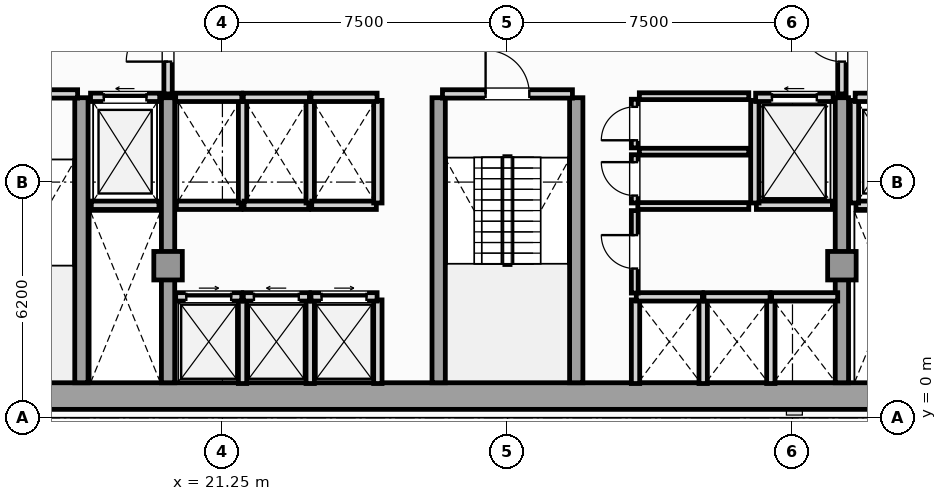
"""IFC4 building model, lengths in metres.
Left out: names, types, materials, properties, quantities, classifications, styles, units other than length and angle.
Written with IfcOpenShell. Run it as: python <this file> out.ifc"""

import sys

from ifc_helpers import new_model, si_unit, direction, frame, frame_2d, origin, origin_2d, place, context, subcontext, project, spatial, rectangle, extrude, element, fill, save


model = new_model("IFC4")
c1 = context("Model", 3, precision=1e-05, world=origin(), true_north=direction((0.0, 1.0)))
c2 = subcontext(c1, "Body", "Model", "MODEL_VIEW")
j1 = project(units=[si_unit("LENGTHUNIT", "METRE"), si_unit("PLANEANGLEUNIT", "RADIAN")], contexts=[c1])
p1 = place(None, origin())
s1 = spatial("IfcSite", under=j1, at=p1, CompositionType="ELEMENT")
p2 = place(p1, origin())
s2 = spatial("IfcBuilding", under=s1, at=p2, CompositionType="ELEMENT")
p3 = place(p2, frame((0.0, 0.0, 72.15)))
s3 = spatial("IfcBuildingStorey", under=s2, at=p3, CompositionType="ELEMENT", Elevation=72.15)
p4 = place(p3, frame((13.25, 0.57, 0.0), z_axis=(0.0, 0.0, 1.0), x_axis=(1.0, 0.0, 0.0)))
e1 = element("IfcWall", 1, at=p4, inside=s3, PredefinedType="SHEAR", context=c2, shape_type="SweptSolid", body=[
    extrude(rectangle(XDim=31.0, YDim=0.7, at=frame_2d((15.5, 0.0))), origin(), (0.0, 0.0, 1.0), 3.57),
])
for number, where, z_axis, x_axis in (
    (2, (17.54, 0.92, 0.0), (0.0, 0.0, 1.0), (0.0, 1.0, 0.0)),
    (3, (19.82, 0.92, 0.0), (0.0, 0.0, 1.0), (0.0, 1.0, 0.0)),
    (4, (26.94, 0.92, 0.0), (0.0, 0.0, 1.0), (0.0, 1.0, 0.0)),
    (5, (30.56, 0.92, 0.0), (0.0, 0.0, 1.0), (0.0, 1.0, 0.0)),
    (6, (37.55, 0.92, 0.0), (0.0, 0.0, 1.0), (0.0, 1.0, 0.0)),
):
    element("IfcWall", number, at=place(p3, frame(where, z_axis=z_axis, x_axis=x_axis)), inside=s3, PredefinedType="SHEAR", context=c2, shape_type="SweptSolid", body=[
        extrude(rectangle(XDim=7.5, YDim=0.35, at=frame_2d((3.75, 0.0))), origin(), (0.0, 0.0, 1.0), 3.57),
    ])
for number, where, z_axis, x_axis in (
    (7, (19.82, 4.0, 0.0), (0.0, 0.0, 1.0), (1.0, 0.0, 0.0)),
    (8, (37.55, 4.0, 0.0), (0.0, 0.0, 1.0), (1.0, 0.0, 0.0)),
):
    element("IfcColumn", number, at=place(p3, frame(where, z_axis=z_axis, x_axis=x_axis)), inside=s3, PredefinedType="COLUMN", context=c2, shape_type="SweptSolid", body=[
        extrude(rectangle(XDim=0.75, YDim=0.75, at=origin_2d()), origin(), (0.0, 0.0, 1.0), 3.85),
    ])
p5 = place(p3, frame((17.8, 5.59, 0.0), z_axis=(0.0, 0.0, 1.0), x_axis=(1.0, 0.0, 0.0)))
e9 = element("IfcWall", 9, at=p5, inside=s3, PredefinedType="SOLIDWALL", context=c2, shape_type="SweptSolid", body=[
    extrude(rectangle(XDim=1.78, YDim=0.22, at=frame_2d((0.89, 0.0))), origin(), (0.0, 0.0, 1.0), 3.57),
])
p6 = place(p3, frame((17.78, 8.43, 0.0), z_axis=(0.0, 0.0, 1.0), x_axis=(1.0, 0.0, 0.0)))
e10 = element("IfcWall", 10, at=p6, inside=s3, PredefinedType="SOLIDWALL", context=c2, shape_type="SweptSolid", body=[
    extrude(rectangle(XDim=1.82, YDim=0.22, at=frame_2d((0.91, 0.0))), origin(), (0.0, 0.0, 1.0), 3.57),
])
p7 = place(p6, frame((0.35, 0.0, 0.0)))
e11 = element("IfcOpeningElement", 11, at=p7, cuts=e10, PredefinedType="OPENING", context=c2, shape_type="SweptSolid", body=[
    extrude(rectangle(XDim=1.12, YDim=2.25, at=frame_2d((0.56, 1.125))), frame((0.0, 0.12, 0.0), z_axis=(0.0, -1.0, 0.0), x_axis=(1.0, 0.0, 0.0)), (0.0, 0.0, 1.0), 0.24),
])
p8 = place(p3, frame((37.92, 5.59, 0.0), z_axis=(0.0, 0.0, 1.0), x_axis=(1.0, 0.0, 0.0)))
e12 = element("IfcWall", 12, at=p8, inside=s3, PredefinedType="SOLIDWALL", context=c2, shape_type="SweptSolid", body=[
    extrude(rectangle(XDim=1.78, YDim=0.22, at=frame_2d((0.89, 0.0))), origin(), (0.0, 0.0, 1.0), 3.57),
])
p9 = place(p3, frame((37.88, 5.65, 0.0), z_axis=(0.0, 0.0, 1.0), x_axis=(0.0, 1.0, 0.0)))
e13 = element("IfcWall", 13, at=p9, inside=s3, PredefinedType="SOLIDWALL", context=c2, shape_type="SweptSolid", body=[
    extrude(rectangle(XDim=2.7, YDim=0.22, at=frame_2d((1.35, 0.0))), origin(), (0.0, 0.0, 1.0), 3.57),
])
p10 = place(p3, frame((37.9, 8.43, 0.0), z_axis=(0.0, 0.0, 1.0), x_axis=(1.0, 0.0, 0.0)))
e14 = element("IfcWall", 14, at=p10, inside=s3, PredefinedType="SOLIDWALL", context=c2, shape_type="SweptSolid", body=[
    extrude(rectangle(XDim=1.82, YDim=0.22, at=frame_2d((0.91, 0.0))), origin(), (0.0, 0.0, 1.0), 3.57),
])
p11 = place(p10, frame((0.35, 0.0, 0.0)))
e15 = element("IfcOpeningElement", 15, at=p11, cuts=e14, PredefinedType="OPENING", context=c2, shape_type="SweptSolid", body=[
    extrude(rectangle(XDim=1.12, YDim=2.25, at=frame_2d((0.56, 1.125))), frame((0.0, 0.12, 0.0), z_axis=(0.0, -1.0, 0.0), x_axis=(1.0, 0.0, 0.0)), (0.0, 0.0, 1.0), 0.24),
])
p12 = place(p3, frame((35.3, 5.59, 0.0), z_axis=(0.0, 0.0, 1.0), x_axis=(1.0, 0.0, 0.0)))
e16 = element("IfcWall", 16, at=p12, inside=s3, PredefinedType="SOLIDWALL", context=c2, shape_type="SweptSolid", body=[
    extrude(rectangle(XDim=2.0, YDim=0.22, at=frame_2d((1.0, 0.0))), origin(), (0.0, 0.0, 1.0), 3.57),
])
p13 = place(p3, frame((35.26, 5.65, 0.0), z_axis=(0.0, 0.0, 1.0), x_axis=(0.0, 1.0, 0.0)))
e17 = element("IfcWall", 17, at=p13, inside=s3, PredefinedType="SOLIDWALL", context=c2, shape_type="SweptSolid", body=[
    extrude(rectangle(XDim=2.7, YDim=0.22, at=frame_2d((1.35, 0.0))), origin(), (0.0, 0.0, 1.0), 3.57),
])
p14 = place(p3, frame((35.28, 8.43, 0.0), z_axis=(0.0, 0.0, 1.0), x_axis=(1.0, 0.0, 0.0)))
e18 = element("IfcWall", 18, at=p14, inside=s3, PredefinedType="SOLIDWALL", context=c2, shape_type="SweptSolid", body=[
    extrude(rectangle(XDim=2.04, YDim=0.22, at=frame_2d((1.02, 0.0))), origin(), (0.0, 0.0, 1.0), 3.57),
])
p15 = place(p14, frame((0.43, 0.0, 0.0)))
e19 = element("IfcOpeningElement", 19, at=p15, cuts=e18, PredefinedType="OPENING", context=c2, shape_type="SweptSolid", body=[
    extrude(rectangle(XDim=1.18, YDim=2.2, at=frame_2d((0.59, 1.1))), frame((0.0, 0.12, 0.0), z_axis=(0.0, -1.0, 0.0), x_axis=(1.0, 0.0, 0.0)), (0.0, 0.0, 1.0), 0.24),
])
p16 = place(p3, frame((21.78, 0.9, 0.0), z_axis=(0.0, 0.0, 1.0), x_axis=(0.0, 1.0, 0.0)))
e20 = element("IfcWall", 20, at=p16, inside=s3, PredefinedType="SOLIDWALL", context=c2, shape_type="SweptSolid", body=[
    extrude(rectangle(XDim=2.2, YDim=0.22, at=frame_2d((1.1, 0.0))), origin(), (0.0, 0.0, 1.0), 3.57),
])
p17 = place(p3, frame((20.02, 3.18, 0.0), z_axis=(0.0, 0.0, 1.0), x_axis=(1.0, 0.0, 0.0)))
e21 = element("IfcWall", 21, at=p17, inside=s3, PredefinedType="SOLIDWALL", context=c2, shape_type="SweptSolid", body=[
    extrude(rectangle(XDim=1.74, YDim=0.22, at=frame_2d((0.87, 0.0))), origin(), (0.0, 0.0, 1.0), 3.57),
])
p18 = place(p17, frame((0.28, 0.0, 0.0)))
e22 = element("IfcOpeningElement", 22, at=p18, cuts=e21, PredefinedType="OPENING", context=c2, shape_type="SweptSolid", body=[
    extrude(rectangle(XDim=1.18, YDim=2.2, at=frame_2d((0.59, 1.1))), frame((0.0, 0.12, 0.0), z_axis=(0.0, -1.0, 0.0), x_axis=(1.0, 0.0, 0.0)), (0.0, 0.0, 1.0), 0.24),
])
p19 = place(p3, frame((23.56, 0.9, 0.0), z_axis=(0.0, 0.0, 1.0), x_axis=(0.0, 1.0, 0.0)))
e23 = element("IfcWall", 23, at=p19, inside=s3, PredefinedType="SOLIDWALL", context=c2, shape_type="SweptSolid", body=[
    extrude(rectangle(XDim=2.2, YDim=0.22, at=frame_2d((1.1, 0.0))), origin(), (0.0, 0.0, 1.0), 3.57),
])
p20 = place(p3, frame((21.8, 3.18, 0.0), z_axis=(0.0, 0.0, 1.0), x_axis=(1.0, 0.0, 0.0)))
e24 = element("IfcWall", 24, at=p20, inside=s3, PredefinedType="SOLIDWALL", context=c2, shape_type="SweptSolid", body=[
    extrude(rectangle(XDim=1.74, YDim=0.22, at=frame_2d((0.87, 0.0))), origin(), (0.0, 0.0, 1.0), 3.57),
])
p21 = place(p20, frame((0.28, 0.0, 0.0)))
e25 = element("IfcOpeningElement", 25, at=p21, cuts=e24, PredefinedType="OPENING", context=c2, shape_type="SweptSolid", body=[
    extrude(rectangle(XDim=1.18, YDim=2.2, at=frame_2d((0.59, 1.1))), frame((0.0, 0.12, 0.0), z_axis=(0.0, -1.0, 0.0), x_axis=(1.0, 0.0, 0.0)), (0.0, 0.0, 1.0), 0.24),
])
p22 = place(p3, frame((25.34, 0.9, 0.0), z_axis=(0.0, 0.0, 1.0), x_axis=(0.0, 1.0, 0.0)))
e26 = element("IfcWall", 26, at=p22, inside=s3, PredefinedType="SOLIDWALL", context=c2, shape_type="SweptSolid", body=[
    extrude(rectangle(XDim=2.2, YDim=0.22, at=frame_2d((1.1, 0.0))), origin(), (0.0, 0.0, 1.0), 3.57),
])
p23 = place(p3, frame((23.58, 3.18, 0.0), z_axis=(0.0, 0.0, 1.0), x_axis=(1.0, 0.0, 0.0)))
e27 = element("IfcWall", 27, at=p23, inside=s3, PredefinedType="SOLIDWALL", context=c2, shape_type="SweptSolid", body=[
    extrude(rectangle(XDim=1.74, YDim=0.22, at=frame_2d((0.87, 0.0))), origin(), (0.0, 0.0, 1.0), 3.57),
])
p24 = place(p23, frame((0.28, 0.0, 0.0)))
e28 = element("IfcOpeningElement", 28, at=p24, cuts=e27, PredefinedType="OPENING", context=c2, shape_type="SweptSolid", body=[
    extrude(rectangle(XDim=1.18, YDim=2.2, at=frame_2d((0.59, 1.1))), frame((0.0, 0.12, 0.0), z_axis=(0.0, -1.0, 0.0), x_axis=(1.0, 0.0, 0.0)), (0.0, 0.0, 1.0), 0.24),
])
for number, where, z_axis, x_axis in (
    (29, (32.12, 0.9, 0.0), (0.0, 0.0, 1.0), (0.0, 1.0, 0.0)),
    (30, (33.9, 0.9, 0.0), (0.0, 0.0, 1.0), (0.0, 1.0, 0.0)),
):
    element("IfcWall", number, at=place(p3, frame(where, z_axis=z_axis, x_axis=x_axis)), inside=s3, PredefinedType="SOLIDWALL", context=c2, shape_type="SweptSolid", body=[
        extrude(rectangle(XDim=2.2, YDim=0.22, at=frame_2d((1.1, 0.0))), origin(), (0.0, 0.0, 1.0), 3.57),
    ])
p25 = place(p3, frame((32.14, 3.18, 0.0), z_axis=(0.0, 0.0, 1.0), x_axis=(1.0, 0.0, 0.0)))
e31 = element("IfcWall", 31, at=p25, inside=s3, PredefinedType="SOLIDWALL", context=c2, shape_type="SweptSolid", body=[
    extrude(rectangle(XDim=1.74, YDim=0.22, at=frame_2d((0.87, 0.0))), origin(), (0.0, 0.0, 1.0), 3.57),
])
p26 = place(p3, frame((35.68, 0.9, 0.0), z_axis=(0.0, 0.0, 1.0), x_axis=(0.0, 1.0, 0.0)))
e32 = element("IfcWall", 32, at=p26, inside=s3, PredefinedType="SOLIDWALL", context=c2, shape_type="SweptSolid", body=[
    extrude(rectangle(XDim=2.2, YDim=0.22, at=frame_2d((1.1, 0.0))), origin(), (0.0, 0.0, 1.0), 3.57),
])
for number, where, z_axis, x_axis in (
    (33, (33.92, 3.18, 0.0), (0.0, 0.0, 1.0), (1.0, 0.0, 0.0)),
    (34, (35.7, 3.18, 0.0), (0.0, 0.0, 1.0), (1.0, 0.0, 0.0)),
):
    element("IfcWall", number, at=place(p3, frame(where, z_axis=z_axis, x_axis=x_axis)), inside=s3, PredefinedType="SOLIDWALL", context=c2, shape_type="SweptSolid", body=[
        extrude(rectangle(XDim=1.74, YDim=0.22, at=frame_2d((0.87, 0.0))), origin(), (0.0, 0.0, 1.0), 3.57),
    ])
p27 = place(p3, frame((20.04, 5.59, 0.0), z_axis=(0.0, 0.0, 1.0), x_axis=(1.0, 0.0, 0.0)))
e35 = element("IfcWall", 35, at=p27, inside=s3, PredefinedType="SOLIDWALL", context=c2, shape_type="SweptSolid", body=[
    extrude(rectangle(XDim=1.7, YDim=0.22, at=frame_2d((0.85, 0.0))), origin(), (0.0, 0.0, 1.0), 3.57),
])
p28 = place(p3, frame((21.78, 5.65, 0.0), z_axis=(0.0, 0.0, 1.0), x_axis=(0.0, 1.0, 0.0)))
e36 = element("IfcWall", 36, at=p28, inside=s3, PredefinedType="SOLIDWALL", context=c2, shape_type="SweptSolid", body=[
    extrude(rectangle(XDim=2.7, YDim=0.22, at=frame_2d((1.35, 0.0))), origin(), (0.0, 0.0, 1.0), 3.57),
])
p29 = place(p3, frame((20.02, 8.43, 0.0), z_axis=(0.0, 0.0, 1.0), x_axis=(1.0, 0.0, 0.0)))
e37 = element("IfcWall", 37, at=p29, inside=s3, PredefinedType="SOLIDWALL", context=c2, shape_type="SweptSolid", body=[
    extrude(rectangle(XDim=1.74, YDim=0.22, at=frame_2d((0.87, 0.0))), origin(), (0.0, 0.0, 1.0), 3.57),
])
p30 = place(p3, frame((21.82, 5.59, 0.0), z_axis=(0.0, 0.0, 1.0), x_axis=(1.0, 0.0, 0.0)))
e38 = element("IfcWall", 38, at=p30, inside=s3, PredefinedType="SOLIDWALL", context=c2, shape_type="SweptSolid", body=[
    extrude(rectangle(XDim=1.7, YDim=0.22, at=frame_2d((0.85, 0.0))), origin(), (0.0, 0.0, 1.0), 3.57),
])
p31 = place(p3, frame((23.56, 5.65, 0.0), z_axis=(0.0, 0.0, 1.0), x_axis=(0.0, 1.0, 0.0)))
e39 = element("IfcWall", 39, at=p31, inside=s3, PredefinedType="SOLIDWALL", context=c2, shape_type="SweptSolid", body=[
    extrude(rectangle(XDim=2.7, YDim=0.22, at=frame_2d((1.35, 0.0))), origin(), (0.0, 0.0, 1.0), 3.57),
])
p32 = place(p3, frame((21.8, 8.43, 0.0), z_axis=(0.0, 0.0, 1.0), x_axis=(1.0, 0.0, 0.0)))
e40 = element("IfcWall", 40, at=p32, inside=s3, PredefinedType="SOLIDWALL", context=c2, shape_type="SweptSolid", body=[
    extrude(rectangle(XDim=1.74, YDim=0.22, at=frame_2d((0.87, 0.0))), origin(), (0.0, 0.0, 1.0), 3.57),
])
p33 = place(p3, frame((23.6, 5.59, 0.0), z_axis=(0.0, 0.0, 1.0), x_axis=(1.0, 0.0, 0.0)))
e41 = element("IfcWall", 41, at=p33, inside=s3, PredefinedType="SOLIDWALL", context=c2, shape_type="SweptSolid", body=[
    extrude(rectangle(XDim=1.7, YDim=0.22, at=frame_2d((0.85, 0.0))), origin(), (0.0, 0.0, 1.0), 3.57),
])
p34 = place(p3, frame((25.34, 5.65, 0.0), z_axis=(0.0, 0.0, 1.0), x_axis=(0.0, 1.0, 0.0)))
e42 = element("IfcWall", 42, at=p34, inside=s3, PredefinedType="SOLIDWALL", context=c2, shape_type="SweptSolid", body=[
    extrude(rectangle(XDim=2.7, YDim=0.22, at=frame_2d((1.35, 0.0))), origin(), (0.0, 0.0, 1.0), 3.57),
])
p35 = place(p3, frame((23.58, 8.43, 0.0), z_axis=(0.0, 0.0, 1.0), x_axis=(1.0, 0.0, 0.0)))
e43 = element("IfcWall", 43, at=p35, inside=s3, PredefinedType="SOLIDWALL", context=c2, shape_type="SweptSolid", body=[
    extrude(rectangle(XDim=1.74, YDim=0.22, at=frame_2d((0.87, 0.0))), origin(), (0.0, 0.0, 1.0), 3.57),
])
p36 = place(p3, frame((14.04, 8.52, 0.0), z_axis=(0.0, 0.0, 1.0), x_axis=(1.0, 0.0, 0.0)))
e44 = element("IfcWall", 44, at=p36, inside=s3, PredefinedType="SOLIDWALL", context=c2, shape_type="SweptSolid", body=[
    extrude(rectangle(XDim=3.4, YDim=0.22, at=frame_2d((1.7, 0.0))), origin(), (0.0, 0.0, 1.0), 3.57),
])
p37 = place(p36, frame((1.125, 0.0, 0.0)))
e45 = element("IfcOpeningElement", 45, at=p37, cuts=e44, PredefinedType="OPENING", context=c2, shape_type="SweptSolid", body=[
    extrude(rectangle(XDim=1.15, YDim=2.2, at=frame_2d((0.575, 1.1))), frame((0.0, 0.12, 0.0), z_axis=(0.0, -1.0, 0.0), x_axis=(1.0, 0.0, 0.0)), (0.0, 0.0, 1.0), 0.24),
])
p38 = place(p3, frame((27.04, 8.52, 0.0), z_axis=(0.0, 0.0, 1.0), x_axis=(1.0, 0.0, 0.0)))
e46 = element("IfcWall", 46, at=p38, inside=s3, PredefinedType="SOLIDWALL", context=c2, shape_type="SweptSolid", body=[
    extrude(rectangle(XDim=3.42, YDim=0.22, at=frame_2d((1.71, 0.0))), origin(), (0.0, 0.0, 1.0), 3.57),
])
p39 = place(p38, frame((1.135, 0.0, 0.0)))
e47 = element("IfcOpeningElement", 47, at=p39, cuts=e46, PredefinedType="OPENING", context=c2, shape_type="SweptSolid", body=[
    extrude(rectangle(XDim=1.15, YDim=2.2, at=frame_2d((0.575, 1.1))), frame((0.0, 0.12, 0.0), z_axis=(0.0, -1.0, 0.0), x_axis=(1.0, 0.0, 0.0)), (0.0, 0.0, 1.0), 0.24),
])
p40 = place(p3, frame((19.82, 8.52, 0.0), z_axis=(0.0, 0.0, 1.0), x_axis=(0.0, 1.0, 0.0)))
e48 = element("IfcWall", 48, at=p40, inside=s3, PredefinedType="SOLIDWALL", context=c2, shape_type="SweptSolid", body=[
    extrude(rectangle(XDim=2.8, YDim=0.22, at=frame_2d((1.4, 0.0))), origin(), (0.0, 0.0, 1.0), 3.026),
])
p41 = place(p40, frame((0.85, 0.0, 0.0)))
e49 = element("IfcOpeningElement", 49, at=p41, cuts=e48, PredefinedType="OPENING", context=c2, shape_type="SweptSolid", body=[
    extrude(rectangle(XDim=1.1, YDim=2.2, at=frame_2d((0.55, 1.1))), frame((0.0, 0.12, 0.0), z_axis=(0.0, -1.0, 0.0), x_axis=(1.0, 0.0, 0.0)), (0.0, 0.0, 1.0), 0.24),
])
p42 = place(p3, frame((37.55, 8.52, 0.0), z_axis=(0.0, 0.0, 1.0), x_axis=(0.0, 1.0, 0.0)))
e50 = element("IfcWall", 50, at=p42, inside=s3, PredefinedType="SOLIDWALL", context=c2, shape_type="SweptSolid", body=[
    extrude(rectangle(XDim=2.8, YDim=0.22, at=frame_2d((1.4, 0.0))), origin(), (0.0, 0.0, 1.0), 3.026),
])
p43 = place(p42, frame((0.85, 0.0, 0.0)))
e51 = element("IfcOpeningElement", 51, at=p43, cuts=e50, PredefinedType="OPENING", context=c2, shape_type="SweptSolid", body=[
    extrude(rectangle(XDim=1.1, YDim=2.2, at=frame_2d((0.55, 1.1))), frame((0.0, 0.12, 0.0), z_axis=(0.0, -1.0, 0.0), x_axis=(1.0, 0.0, 0.0)), (0.0, 0.0, 1.0), 0.24),
])
p44 = place(p3, frame((32.1, 5.65, 0.0), z_axis=(0.0, 0.0, 1.0), x_axis=(0.0, 1.0, 0.0)))
e52 = element("IfcWall", 52, at=p44, inside=s3, PredefinedType="PARTITIONING", context=c2, shape_type="SweptSolid", body=[
    extrude(rectangle(XDim=1.27, YDim=0.18, at=frame_2d((0.635, 0.0))), origin(), (0.0, 0.0, 1.0), 3.57),
])
p45 = place(p44, frame((0.195, 0.0, 0.0)))
e53 = element("IfcOpeningElement", 53, at=p45, cuts=e52, PredefinedType="OPENING", context=c2, shape_type="SweptSolid", body=[
    extrude(rectangle(XDim=0.88, YDim=2.05, at=frame_2d((0.44, 1.025))), frame((0.0, 0.1, 0.0), z_axis=(0.0, -1.0, 0.0), x_axis=(1.0, 0.0, 0.0)), (0.0, 0.0, 1.0), 0.2),
])
p46 = place(p3, frame((32.22, 7.0, 0.0), z_axis=(0.0, 0.0, 1.0), x_axis=(1.0, 0.0, 0.0)))
e54 = element("IfcWall", 54, at=p46, inside=s3, PredefinedType="PARTITIONING", context=c2, shape_type="SweptSolid", body=[
    extrude(rectangle(XDim=2.88, YDim=0.18, at=frame_2d((1.44, 0.0))), origin(), (0.0, 0.0, 1.0), 3.57),
])
p47 = place(p3, frame((32.18, 5.57, 0.0), z_axis=(0.0, 0.0, 1.0), x_axis=(1.0, 0.0, 0.0)))
e55 = element("IfcWall", 55, at=p47, inside=s3, PredefinedType="PARTITIONING", context=c2, shape_type="SweptSolid", body=[
    extrude(rectangle(XDim=2.92, YDim=0.18, at=frame_2d((1.46, 0.0))), origin(), (0.0, 0.0, 1.0), 3.57),
])
p48 = place(p3, frame((32.1, 7.1, 0.0), z_axis=(0.0, 0.0, 1.0), x_axis=(0.0, 1.0, 0.0)))
e56 = element("IfcWall", 56, at=p48, inside=s3, PredefinedType="PARTITIONING", context=c2, shape_type="SweptSolid", body=[
    extrude(rectangle(XDim=1.28, YDim=0.18, at=frame_2d((0.64, 0.0))), origin(), (0.0, 0.0, 1.0), 3.57),
])
p49 = place(p48, frame((0.2, 0.0, 0.0)))
e57 = element("IfcOpeningElement", 57, at=p49, cuts=e56, PredefinedType="OPENING", context=c2, shape_type="SweptSolid", body=[
    extrude(rectangle(XDim=0.88, YDim=2.05, at=frame_2d((0.44, 1.025))), frame((0.0, 0.1, 0.0), z_axis=(0.0, -1.0, 0.0), x_axis=(1.0, 0.0, 0.0)), (0.0, 0.0, 1.0), 0.2),
])
p50 = place(p3, frame((32.22, 8.46, 0.0), z_axis=(0.0, 0.0, 1.0), x_axis=(1.0, 0.0, 0.0)))
e58 = element("IfcWall", 58, at=p50, inside=s3, PredefinedType="PARTITIONING", context=c2, shape_type="SweptSolid", body=[
    extrude(rectangle(XDim=2.88, YDim=0.18, at=frame_2d((1.44, 0.0))), origin(), (0.0, 0.0, 1.0), 3.57),
])
p51 = place(p3, frame((32.1, 3.28, 0.0), z_axis=(0.0, 0.0, 1.0), x_axis=(0.0, 1.0, 0.0)))
e59 = element("IfcWall", 59, at=p51, inside=s3, PredefinedType="PARTITIONING", context=c2, shape_type="SweptSolid", body=[
    extrude(rectangle(XDim=2.17, YDim=0.18, at=frame_2d((1.085, 0.0))), origin(), (0.0, 0.0, 1.0), 3.57),
])
p52 = place(p51, frame((0.645, 0.0, 0.0)))
e60 = element("IfcOpeningElement", 60, at=p52, cuts=e59, PredefinedType="OPENING", context=c2, shape_type="SweptSolid", body=[
    extrude(rectangle(XDim=0.88, YDim=2.05, at=frame_2d((0.44, 1.025))), frame((0.0, 0.1, 0.0), z_axis=(0.0, -1.0, 0.0), x_axis=(1.0, 0.0, 0.0)), (0.0, 0.0, 1.0), 0.2),
])
p53 = place(p7, origin())
e61 = element("IfcDoor", 61, at=p53, inside=s3, OperationType="SLIDING_TO_LEFT", PredefinedType="DOOR", context=c2, shape_type="SweptSolid", body=[
    extrude(rectangle(XDim=1.12, YDim=2.25, at=frame_2d((0.56, 1.125))), frame((0.0, 0.025, 0.0), z_axis=(0.0, -1.0, 0.0), x_axis=(1.0, 0.0, 0.0)), (0.0, 0.0, 1.0), 0.05),
])
fill(e11, e61)
p54 = place(p15, origin())
e62 = element("IfcDoor", 62, at=p54, inside=s3, OperationType="SLIDING_TO_LEFT", PredefinedType="DOOR", context=c2, shape_type="SweptSolid", body=[
    extrude(rectangle(XDim=1.18, YDim=2.2, at=frame_2d((0.59, 1.1))), frame((0.0, 0.025, 0.0), z_axis=(0.0, -1.0, 0.0), x_axis=(1.0, 0.0, 0.0)), (0.0, 0.0, 1.0), 0.05),
])
fill(e19, e62)
p55 = place(p18, origin())
e63 = element("IfcDoor", 63, at=p55, inside=s3, OperationType="SLIDING_TO_RIGHT", PredefinedType="DOOR", context=c2, shape_type="SweptSolid", body=[
    extrude(rectangle(XDim=1.18, YDim=2.2, at=frame_2d((0.59, 1.1))), frame((0.0, 0.025, 0.0), z_axis=(0.0, -1.0, 0.0), x_axis=(1.0, 0.0, 0.0)), (0.0, 0.0, 1.0), 0.05),
])
fill(e22, e63)
p56 = place(p21, origin())
e64 = element("IfcDoor", 64, at=p56, inside=s3, OperationType="SLIDING_TO_LEFT", PredefinedType="DOOR", context=c2, shape_type="SweptSolid", body=[
    extrude(rectangle(XDim=1.18, YDim=2.2, at=frame_2d((0.59, 1.1))), frame((0.0, 0.025, 0.0), z_axis=(0.0, -1.0, 0.0), x_axis=(1.0, 0.0, 0.0)), (0.0, 0.0, 1.0), 0.05),
])
fill(e25, e64)
p57 = place(p24, origin())
e65 = element("IfcDoor", 65, at=p57, inside=s3, OperationType="SLIDING_TO_RIGHT", PredefinedType="DOOR", context=c2, shape_type="SweptSolid", body=[
    extrude(rectangle(XDim=1.18, YDim=2.2, at=frame_2d((0.59, 1.1))), frame((0.0, 0.025, 0.0), z_axis=(0.0, -1.0, 0.0), x_axis=(1.0, 0.0, 0.0)), (0.0, 0.0, 1.0), 0.05),
])
fill(e28, e65)
p58 = place(p39, origin())
e66 = element("IfcDoor", 66, at=p58, inside=s3, OperationType="SINGLE_SWING_LEFT", PredefinedType="DOOR", context=c2, shape_type="SweptSolid", body=[
    extrude(rectangle(XDim=1.15, YDim=2.2, at=frame_2d((0.575, 1.1))), frame((0.0, 0.025, 0.0), z_axis=(0.0, -1.0, 0.0), x_axis=(1.0, 0.0, 0.0)), (0.0, 0.0, 1.0), 0.05),
])
fill(e47, e66)
p59 = place(p41, origin())
e67 = element("IfcDoor", 67, at=p59, inside=s3, OperationType="SINGLE_SWING_LEFT", PredefinedType="DOOR", context=c2, shape_type="SweptSolid", body=[
    extrude(rectangle(XDim=1.1, YDim=2.2, at=frame_2d((0.55, 1.1))), frame((0.0, 0.025, 0.0), z_axis=(0.0, -1.0, 0.0), x_axis=(1.0, 0.0, 0.0)), (0.0, 0.0, 1.0), 0.05),
])
fill(e49, e67)
p60 = place(p43, origin())
e68 = element("IfcDoor", 68, at=p60, inside=s3, OperationType="SINGLE_SWING_RIGHT", PredefinedType="DOOR", context=c2, shape_type="SweptSolid", body=[
    extrude(rectangle(XDim=1.1, YDim=2.2, at=frame_2d((0.55, 1.1))), frame((0.0, 0.025, 0.0), z_axis=(0.0, -1.0, 0.0), x_axis=(1.0, 0.0, 0.0)), (0.0, 0.0, 1.0), 0.05),
])
fill(e51, e68)
p61 = place(p45, origin())
e69 = element("IfcDoor", 69, at=p61, inside=s3, OperationType="SINGLE_SWING_RIGHT", PredefinedType="DOOR", context=c2, shape_type="SweptSolid", body=[
    extrude(rectangle(XDim=0.88, YDim=2.05, at=frame_2d((0.44, 1.025))), frame((0.0, 0.025, 0.0), z_axis=(0.0, -1.0, 0.0), x_axis=(1.0, 0.0, 0.0)), (0.0, 0.0, 1.0), 0.05),
])
fill(e53, e69)
p62 = place(p49, origin())
e70 = element("IfcDoor", 70, at=p62, inside=s3, OperationType="SINGLE_SWING_LEFT", PredefinedType="DOOR", context=c2, shape_type="SweptSolid", body=[
    extrude(rectangle(XDim=0.88, YDim=2.05, at=frame_2d((0.44, 1.025))), frame((0.0, 0.025, 0.0), z_axis=(0.0, -1.0, 0.0), x_axis=(1.0, 0.0, 0.0)), (0.0, 0.0, 1.0), 0.05),
])
fill(e57, e70)
p63 = place(p52, origin())
e71 = element("IfcDoor", 71, at=p63, inside=s3, OperationType="SINGLE_SWING_RIGHT", PredefinedType="DOOR", context=c2, shape_type="SweptSolid", body=[
    extrude(rectangle(XDim=0.88, YDim=2.05, at=frame_2d((0.44, 1.025))), frame((0.0, 0.025, 0.0), z_axis=(0.0, -1.0, 0.0), x_axis=(1.0, 0.0, 0.0)), (0.0, 0.0, 1.0), 0.05),
])
fill(e60, e71)
save(model, sys.argv[1])
